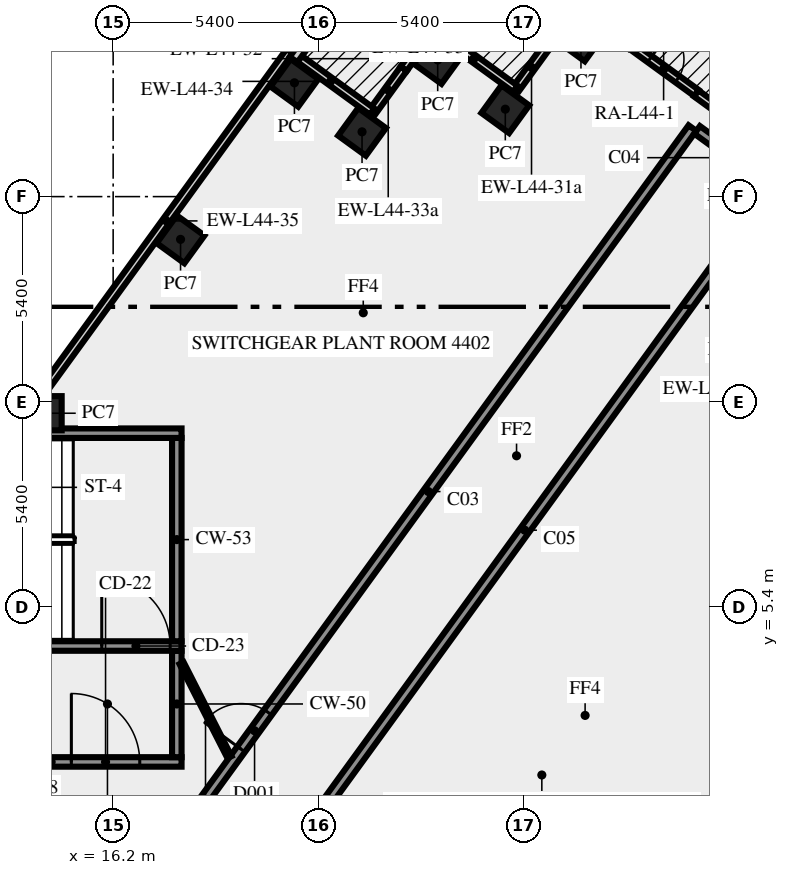
"""IFC4 building model, lengths in metres.
Left out: names, types, materials, properties, quantities, classifications, styles, units other than length and angle.
Written with IfcOpenShell. Run it as: python <this file> out.ifc"""

import sys

from ifc_helpers import new_model, si_unit, direction, frame, frame_2d, origin, origin_2d, place, context, subcontext, project, spatial, rectangle, extrude, element, fill, save


model = new_model("IFC4")
c1 = context("Model", 3, precision=1e-05, world=origin(), true_north=direction((0.0, 1.0)))
c2 = subcontext(c1, "Body", "Model", "MODEL_VIEW")
j1 = project(units=[si_unit("LENGTHUNIT", "METRE"), si_unit("PLANEANGLEUNIT", "RADIAN")], contexts=[c1])
p1 = place(None, origin())
s1 = spatial("IfcSite", under=j1, at=p1, CompositionType="ELEMENT")
p2 = place(p1, origin())
s2 = spatial("IfcBuilding", under=s1, at=p2, CompositionType="ELEMENT")
p3 = place(p2, frame((0.0, 0.0, 188.0)))
s3 = spatial("IfcBuildingStorey", under=s2, at=p3, CompositionType="ELEMENT", Elevation=188.0)
for number, where, z_axis, x_axis in (
    (1, (28.51, 20.39, 0.0), (0.0, 0.0, 1.0), (-0.588, -0.809, 0.0)),
    (2, (26.519, 18.5, 0.0), (0.0, 0.0, 1.0), (-0.809, 0.588, 0.0)),
    (3, (24.74, 19.795, 0.0), (0.0, 0.0, 1.0), (-0.588, -0.809, 0.0)),
    (4, (22.749, 17.904, 0.0), (0.0, 0.0, 1.0), (-0.588, -0.809, 0.0)),
    (5, (20.97, 19.195, 0.0), (0.0, 0.0, 1.0), (-0.588, -0.809, 0.0)),
    (6, (17.974, 15.075, 0.0), (0.0, 0.0, 1.0), (-0.588, -0.809, 0.0)),
    (7, (14.395, 10.5, 0.0), (0.0, 0.0, 1.0), (-1.0, 0.0, 0.0)),
):
    element("IfcColumn", number, at=place(p3, frame(where, z_axis=z_axis, x_axis=x_axis)), inside=s3, PredefinedType="COLUMN", context=c2, shape_type="SweptSolid", body=[
        extrude(rectangle(XDim=0.9, YDim=0.9, at=origin_2d()), origin(), (0.0, 0.0, 1.0), 5.65),
    ])
p4 = place(p3, frame((28.82, -6.724, 0.0), z_axis=(0.0, 0.0, 1.0), x_axis=(0.587789790223, 0.809013697356, 0.0)))
e8 = element("IfcWall", 8, at=p4, inside=s3, PredefinedType="SOLIDWALL", context=c2, shape_type="SweptSolid", body=[
    extrude(rectangle(XDim=16.956, YDim=0.2, at=frame_2d((8.478, 0.0))), origin(), (0.0, 0.0, 1.0), 5.65),
])
p5 = place(p3, frame((37.594, 14.519, 0.0), z_axis=(0.0, 0.0, 1.0), x_axis=(-0.809028102457, 0.587769963025, 0.0)))
e9 = element("IfcWall", 9, at=p5, inside=s3, PredefinedType="SOLIDWALL", context=c2, shape_type="SweptSolid", body=[
    extrude(rectangle(XDim=7.481, YDim=0.2, at=frame_2d((3.741, 0.0))), origin(), (0.0, 0.0, 1.0), 5.65),
])
p6 = place(p3, frame((29.82, 20.183, 0.0), z_axis=(0.0, 0.0, 1.0), x_axis=(0.809022465264, -0.587777722186, 0.0)))
e10 = element("IfcWall", 10, at=p6, inside=s3, PredefinedType="SOLIDWALL", context=c2, shape_type="SweptSolid", body=[
    extrude(rectangle(XDim=2.137, YDim=0.2, at=frame_2d((1.069, 0.0))), origin(), (0.0, 0.0, 1.0), 5.65),
])
p7 = place(p6, frame((0.619, 0.0, 0.0)))
e11 = element("IfcOpeningElement", 11, at=p7, cuts=e10, PredefinedType="OPENING", context=c2, shape_type="SweptSolid", body=[
    extrude(rectangle(XDim=0.9, YDim=2.1, at=frame_2d((0.45, 1.05))), frame((0.0, 0.11, 0.0), z_axis=(0.0, -1.0, 0.0), x_axis=(1.0, 0.0, 0.0)), (0.0, 0.0, 1.0), 0.22),
])
p8 = place(p3, frame((27.616, 20.16, 0.0), z_axis=(0.0, 0.0, 1.0), x_axis=(-0.587731903943, -0.809055751533, 0.0)))
e12 = element("IfcWall", 12, at=p8, inside=s3, PredefinedType="SOLIDWALL", context=c2, shape_type="SweptSolid", body=[
    extrude(rectangle(XDim=1.386, YDim=0.2, at=frame_2d((0.693, 0.0))), origin(), (0.0, 0.0, 1.0), 4.15),
])
p9 = place(p3, frame((26.785, 19.036, 0.0), z_axis=(0.0, 0.0, 1.0), x_axis=(-0.809064397168, 0.587720002413, 0.0)))
e13 = element("IfcWall", 13, at=p9, inside=s3, PredefinedType="SOLIDWALL", context=c2, shape_type="SweptSolid", body=[
    extrude(rectangle(XDim=2.7, YDim=0.2, at=frame_2d((1.35, 0.0))), origin(), (0.0, 0.0, 1.0), 5.65),
])
p10 = place(p3, frame((24.617, 20.625, 0.0), z_axis=(0.0, 0.0, 1.0), x_axis=(-0.587772972264, -0.809025916196, 0.0)))
e14 = element("IfcWall", 14, at=p10, inside=s3, PredefinedType="SOLIDWALL", context=c2, shape_type="SweptSolid", body=[
    extrude(rectangle(XDim=1.311, YDim=0.2, at=frame_2d((0.655, 0.0))), origin(), (0.0, 0.0, 1.0), 5.65),
])
p11 = place(p3, frame((23.846, 19.565, 0.0), z_axis=(0.0, 0.0, 1.0), x_axis=(-0.587753586678, -0.809039999844, 0.0)))
e15 = element("IfcWall", 15, at=p11, inside=s3, PredefinedType="SOLIDWALL", context=c2, shape_type="SweptSolid", body=[
    extrude(rectangle(XDim=1.389, YDim=0.2, at=frame_2d((0.694, 0.0))), origin(), (0.0, 0.0, 1.0), 4.15),
])
p12 = place(p3, frame((23.013, 18.438, 0.0), z_axis=(0.0, 0.0, 1.0), x_axis=(-0.808990163075, 0.587822180636, 0.0)))
e16 = element("IfcWall", 16, at=p12, inside=s3, PredefinedType="SOLIDWALL", context=c2, shape_type="SweptSolid", body=[
    extrude(rectangle(XDim=2.7, YDim=0.2, at=frame_2d((1.35, 0.0))), origin(), (0.0, 0.0, 1.0), 5.65),
])
p13 = place(p3, frame((20.846, 20.028, 0.0), z_axis=(0.0, 0.0, 1.0), x_axis=(-0.58779571445, -0.809009393069, 0.0)))
e17 = element("IfcWall", 17, at=p13, inside=s3, PredefinedType="SOLIDWALL", context=c2, shape_type="SweptSolid", body=[
    extrude(rectangle(XDim=11.044, YDim=0.2, at=frame_2d((5.522, 0.0))), origin(), (0.0, 0.0, 1.0), 5.65),
])
p14 = place(p3, frame((20.948, 19.806, 0.0), z_axis=(0.0, 0.0, 1.0), x_axis=(0.587780660559, 0.809020330444, 0.0)))
e18 = element("IfcWall", 18, at=p14, inside=s3, PredefinedType="PARAPET", context=c2, shape_type="SweptSolid", body=[
    extrude(rectangle(XDim=11.77, YDim=0.25, at=frame_2d((5.885, 0.0))), origin(), (0.0, 0.0, 1.0), 1.1),
])
p15 = place(p3, frame((14.1, 1.325, 0.0), z_axis=(0.0, 0.0, 1.0), x_axis=(1.0, 0.0, 0.0)))
e19 = element("IfcWall", 19, at=p15, inside=s3, PredefinedType="SHEAR", context=c2, shape_type="SweptSolid", body=[
    extrude(rectangle(XDim=3.9, YDim=0.25, at=frame_2d((1.95, 0.0))), origin(), (0.0, 0.0, 1.0), 5.65),
])
p16 = place(p15, frame((1.0, 0.0, 0.0)))
e20 = element("IfcOpeningElement", 20, at=p16, cuts=e19, PredefinedType="OPENING", context=c2, shape_type="SweptSolid", body=[
    extrude(rectangle(XDim=1.8, YDim=2.1, at=frame_2d((0.9, 1.05))), frame((0.0, 0.135, 0.0), z_axis=(0.0, -1.0, 0.0), x_axis=(1.0, 0.0, 0.0)), (0.0, 0.0, 1.0), 0.27),
])
p17 = place(p3, frame((17.875, 1.45, 0.0), z_axis=(0.0, 0.0, 1.0), x_axis=(0.0, 1.0, 0.0)))
e21 = element("IfcWall", 21, at=p17, inside=s3, PredefinedType="SHEAR", context=c2, shape_type="SweptSolid", body=[
    extrude(rectangle(XDim=2.8, YDim=0.25, at=frame_2d((1.4, 0.0))), origin(), (0.0, 0.0, 1.0), 5.65),
])
p18 = place(p3, frame((7.5, 4.375, 0.0), z_axis=(0.0, 0.0, 1.0), x_axis=(1.0, 0.0, 0.0)))
e22 = element("IfcWall", 22, at=p18, inside=s3, PredefinedType="SHEAR", context=c2, shape_type="SweptSolid", body=[
    extrude(rectangle(XDim=10.5, YDim=0.25, at=frame_2d((5.25, 0.0))), origin(), (0.0, 0.0, 1.0), 5.65),
])
p19 = place(p18, frame((8.4, 0.0, 0.0)))
e23 = element("IfcOpeningElement", 23, at=p19, cuts=e22, PredefinedType="OPENING", context=c2, shape_type="SweptSolid", body=[
    extrude(rectangle(XDim=1.8, YDim=2.1, at=frame_2d((0.9, 1.05))), frame((0.0, 0.135, 0.0), z_axis=(0.0, -1.0, 0.0), x_axis=(1.0, 0.0, 0.0)), (0.0, 0.0, 1.0), 0.27),
])
p20 = place(p3, frame((17.875, 4.5, 0.0), z_axis=(0.0, 0.0, 1.0), x_axis=(0.0, 1.0, 0.0)))
e24 = element("IfcWall", 24, at=p20, inside=s3, PredefinedType="SHEAR", context=c2, shape_type="SweptSolid", body=[
    extrude(rectangle(XDim=5.35, YDim=0.25, at=frame_2d((2.675, 0.0))), origin(), (0.0, 0.0, 1.0), 5.65),
])
p21 = place(p3, frame((7.5, 9.975, 0.0), z_axis=(0.0, 0.0, 1.0), x_axis=(1.0, 0.0, 0.0)))
e25 = element("IfcWall", 25, at=p21, inside=s3, PredefinedType="SHEAR", context=c2, shape_type="SweptSolid", body=[
    extrude(rectangle(XDim=10.5, YDim=0.25, at=frame_2d((5.25, 0.0))), origin(), (0.0, 0.0, 1.0), 5.65),
])
p22 = place(p21, frame((2.0, 0.0, 1.0)))
e26 = element("IfcOpeningElement", 26, at=p22, cuts=e25, PredefinedType="OPENING", context=c2, shape_type="SweptSolid", body=[
    extrude(rectangle(XDim=1.2, YDim=1.2, at=frame_2d((0.6, 0.6))), frame((0.0, 0.135, 0.0), z_axis=(0.0, -1.0, 0.0), x_axis=(1.0, 0.0, 0.0)), (0.0, 0.0, 1.0), 0.27),
])
p23 = place(p3, frame((17.545, -1.125, 0.0), z_axis=(0.0, 0.0, 1.0), x_axis=(0.587789755823, 0.80901372235, 0.0)))
e27 = element("IfcWall", 27, at=p23, inside=s3, PredefinedType="SOLIDWALL", context=c2, shape_type="SweptSolid", body=[
    extrude(rectangle(XDim=23.645, YDim=0.25, at=frame_2d((11.822, 0.0))), origin(), (0.0, 0.0, 1.0), 5.65),
])
p24 = place(p23, frame((3.442, 0.0, 0.0)))
e28 = element("IfcOpeningElement", 28, at=p24, cuts=e27, PredefinedType="OPENING", context=c2, shape_type="SweptSolid", body=[
    extrude(rectangle(XDim=1.2, YDim=2.1, at=frame_2d((0.6, 1.05))), frame((0.0, 0.135, 0.0), z_axis=(0.0, -1.0, 0.0), x_axis=(1.0, 0.0, 0.0)), (0.0, 0.0, 1.0), 0.27),
])
p25 = place(p3, frame((31.567, 17.956, 0.0), z_axis=(0.0, 0.0, 1.0), x_axis=(0.809011863271, -0.587792314586, 0.0)))
e29 = element("IfcWall", 29, at=p25, inside=s3, PredefinedType="SOLIDWALL", context=c2, shape_type="SweptSolid", body=[
    extrude(rectangle(XDim=2.488, YDim=0.25, at=frame_2d((1.244, 0.0))), origin(), (0.0, 0.0, 1.0), 5.65),
])
p26 = place(p3, frame((33.531, 16.369, 0.0), z_axis=(0.0, 0.0, 1.0), x_axis=(-0.587781095509, -0.809020014438, 0.0)))
e30 = element("IfcWall", 30, at=p26, inside=s3, PredefinedType="SOLIDWALL", context=c2, shape_type="SweptSolid", body=[
    extrude(rectangle(XDim=22.117, YDim=0.25, at=frame_2d((11.058, 0.0))), origin(), (0.0, 0.0, 1.0), 5.65),
])
p27 = place(p26, frame((20.384, 0.0, 0.0)))
e31 = element("IfcOpeningElement", 31, at=p27, cuts=e30, PredefinedType="OPENING", context=c2, shape_type="SweptSolid", body=[
    extrude(rectangle(XDim=1.2, YDim=2.1, at=frame_2d((0.6, 1.05))), frame((0.0, 0.135, 0.0), z_axis=(0.0, -1.0, 0.0), x_axis=(1.0, 0.0, 0.0)), (0.0, 0.0, 1.0), 0.27),
])
p28 = place(p3, frame((18.0, 3.925, 0.0), z_axis=(0.0, 0.0, 1.0), x_axis=(0.453950796792, -0.891026752736, 0.0)))
e32 = element("IfcWall", 32, at=p28, inside=s3, PredefinedType="PARTITIONING", context=c2, shape_type="SweptSolid", body=[
    extrude(rectangle(XDim=2.778, YDim=0.12, at=frame_2d((1.389, 0.0))), origin(), (0.0, 0.0, 1.0), 5.65),
])
p29 = place(p7, origin())
e33 = element("IfcDoor", 33, at=p29, inside=s3, OperationType="SINGLE_SWING_RIGHT", PredefinedType="DOOR", context=c2, shape_type="SweptSolid", body=[
    extrude(rectangle(XDim=0.9, YDim=2.1, at=frame_2d((0.45, 1.05))), frame((0.0, 0.025, 0.0), z_axis=(0.0, -1.0, 0.0), x_axis=(1.0, 0.0, 0.0)), (0.0, 0.0, 1.0), 0.05),
])
fill(e11, e33)
p30 = place(p16, origin())
e34 = element("IfcDoor", 34, at=p30, inside=s3, OperationType="DOUBLE_DOOR_SINGLE_SWING", PredefinedType="DOOR", context=c2, shape_type="SweptSolid", body=[
    extrude(rectangle(XDim=1.8, YDim=2.1, at=frame_2d((0.9, 1.05))), frame((0.0, 0.025, 0.0), z_axis=(0.0, -1.0, 0.0), x_axis=(1.0, 0.0, 0.0)), (0.0, 0.0, 1.0), 0.05),
])
fill(e20, e34)
p31 = place(p19, origin())
e35 = element("IfcDoor", 35, at=p31, inside=s3, OperationType="DOUBLE_DOOR_SINGLE_SWING", PredefinedType="DOOR", context=c2, shape_type="SweptSolid", body=[
    extrude(rectangle(XDim=1.8, YDim=2.1, at=frame_2d((0.9, 1.05))), frame((0.0, 0.025, 0.0), z_axis=(0.0, -1.0, 0.0), x_axis=(1.0, 0.0, 0.0)), (0.0, 0.0, 1.0), 0.05),
])
fill(e23, e35)
p32 = place(p24, origin())
e36 = element("IfcDoor", 36, at=p32, inside=s3, OperationType="SINGLE_SWING_LEFT", PredefinedType="DOOR", context=c2, shape_type="SweptSolid", body=[
    extrude(rectangle(XDim=1.2, YDim=2.1, at=frame_2d((0.6, 1.05))), frame((0.0, 0.025, 0.0), z_axis=(0.0, -1.0, 0.0), x_axis=(1.0, 0.0, 0.0)), (0.0, 0.0, 1.0), 0.05),
])
fill(e28, e36)
save(model, sys.argv[1])
